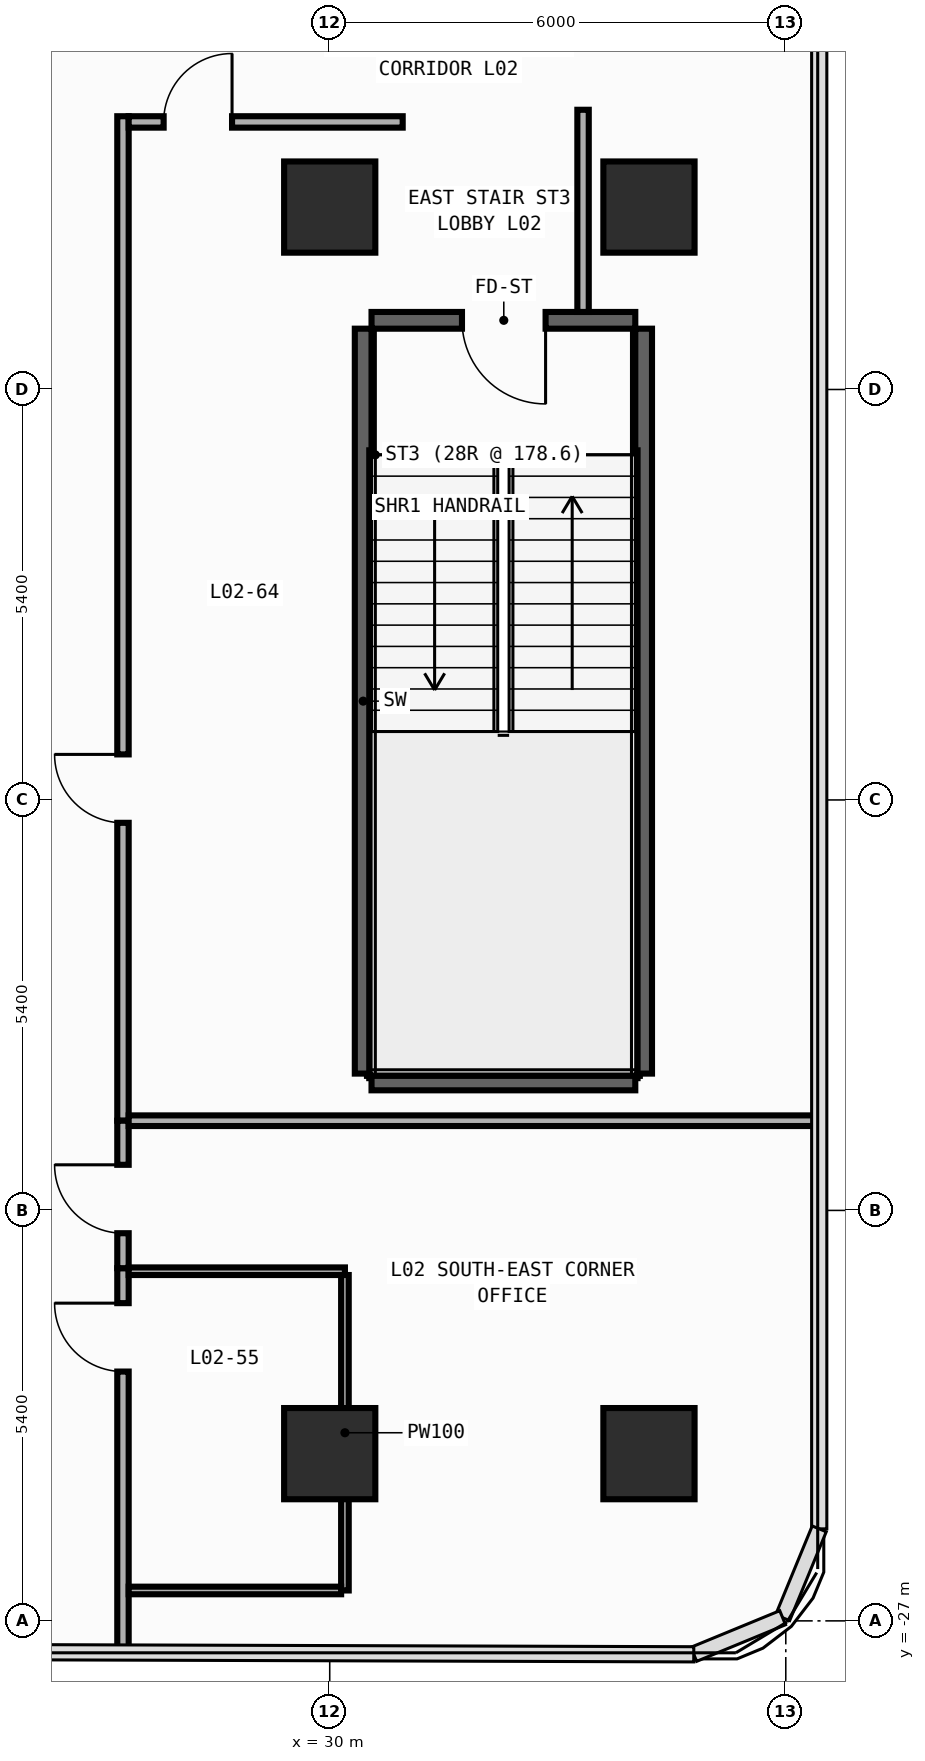
"""IFC4 building model, lengths in metres.
Left out: names, types, materials, properties, quantities, classifications, styles, units other than length and angle.
Written with IfcOpenShell. Run it as: python <this file> out.ifc"""

import sys

from ifc_helpers import new_model, si_unit, direction, frame, frame_2d, origin, origin_2d, place, context, subcontext, project, spatial, rectangle, extrude, element, fill, save


model = new_model("IFC4")
c1 = context("Model", 3, precision=1e-05, world=origin(), true_north=direction((0.0, 1.0)))
c2 = subcontext(c1, "Body", "Model", "MODEL_VIEW")
j1 = project(units=[si_unit("LENGTHUNIT", "METRE"), si_unit("PLANEANGLEUNIT", "RADIAN")], contexts=[c1])
p1 = place(None, origin())
s1 = spatial("IfcSite", under=j1, at=p1, CompositionType="ELEMENT")
p2 = place(p1, origin())
s2 = spatial("IfcBuilding", under=s1, at=p2, CompositionType="ELEMENT")
p3 = place(p2, frame((0.0, 0.0, 6.0)))
s3 = spatial("IfcBuildingStorey", under=s2, at=p3, CompositionType="ELEMENT", Elevation=6.0)
p4 = place(p3, frame((34.02, -9.89, 0.0), z_axis=(0.0, 0.0, 1.0), x_axis=(-1.0, 0.0, 0.0)))
e1 = element("IfcWall", 1, at=p4, inside=s3, PredefinedType="SHEAR", context=c2, shape_type="SweptSolid", body=[
    extrude(rectangle(XDim=3.47, YDim=0.22, at=frame_2d((1.735, 0.0))), origin(), (0.0, 0.0, 1.0), 4.7),
])
p5 = place(p4, frame((1.18, 0.0, 0.0)))
e2 = element("IfcOpeningElement", 2, at=p5, cuts=e1, PredefinedType="OPENING", context=c2, shape_type="SweptSolid", body=[
    extrude(rectangle(XDim=1.1, YDim=2.2, at=frame_2d((0.55, 1.1))), frame((0.0, 0.12, 0.0), z_axis=(0.0, -1.0, 0.0), x_axis=(1.0, 0.0, 0.0)), (0.0, 0.0, 1.0), 0.24),
])
p6 = place(p3, frame((30.55, -19.91, 0.0), z_axis=(0.0, 0.0, 1.0), x_axis=(1.0, 0.0, 0.0)))
e3 = element("IfcWall", 3, at=p6, inside=s3, PredefinedType="SHEAR", context=c2, shape_type="SweptSolid", body=[
    extrude(rectangle(XDim=3.47, YDim=0.22, at=frame_2d((1.735, 0.0))), origin(), (0.0, 0.0, 1.0), 4.7),
])
for number, where, z_axis, x_axis in (
    (4, (30.44, -19.8, 0.0), (0.0, 0.0, 1.0), (0.0, 1.0, 0.0)),
    (5, (34.13, -19.8, 0.0), (0.0, 0.0, 1.0), (0.0, 1.0, 0.0)),
):
    element("IfcWall", number, at=place(p3, frame(where, z_axis=z_axis, x_axis=x_axis)), inside=s3, PredefinedType="SHEAR", context=c2, shape_type="SweptSolid", body=[
        extrude(rectangle(XDim=9.8, YDim=0.22, at=frame_2d((4.9, 0.0))), origin(), (0.0, 0.0, 1.0), 4.7),
    ])
for number, where, z_axis, x_axis in (
    (6, (30.0, -24.8, 0.0), (0.0, 0.0, 1.0), (1.0, 0.0, 0.0)),
    (7, (30.0, -8.4, 0.0), (0.0, 0.0, 1.0), (1.0, 0.0, 0.0)),
    (8, (34.2, -24.8, 0.0), (0.0, 0.0, 1.0), (1.0, 0.0, 0.0)),
    (9, (34.2, -8.4, 0.0), (0.0, 0.0, 1.0), (1.0, 0.0, 0.0)),
):
    element("IfcColumn", number, at=place(p3, frame(where, z_axis=z_axis, x_axis=x_axis)), inside=s3, PredefinedType="COLUMN", context=c2, shape_type="SweptSolid", body=[
        extrude(rectangle(XDim=1.2, YDim=1.2, at=origin_2d()), origin(), (0.0, 0.0, 1.0), 5.0),
    ])
p7 = place(p3, frame((27.28, -27.421, 0.0), z_axis=(0.0, 0.0, 1.0), x_axis=(0.0, 1.0, 0.0)))
e10 = element("IfcWall", 10, at=p7, inside=s3, PredefinedType="PARTITIONING", context=c2, shape_type="SweptSolid", body=[
    extrude(rectangle(XDim=5.061, YDim=0.15, at=frame_2d((2.531, 0.0))), origin(), (0.0, 0.0, 1.0), 4.7),
])
p8 = place(p7, frame((3.701, 0.0, 0.0)))
e11 = element("IfcOpeningElement", 11, at=p8, cuts=e10, PredefinedType="OPENING", context=c2, shape_type="SweptSolid", body=[
    extrude(rectangle(XDim=0.9, YDim=2.15, at=frame_2d((0.45, 1.075))), frame((0.0, 0.085, 0.0), z_axis=(0.0, -1.0, 0.0), x_axis=(1.0, 0.0, 0.0)), (0.0, 0.0, 1.0), 0.17),
])
p9 = place(p3, frame((27.28, -20.42, 0.0), z_axis=(0.0, 0.0, 1.0), x_axis=(0.0, 1.0, 0.0)))
e12 = element("IfcWall", 12, at=p9, inside=s3, PredefinedType="PARTITIONING", context=c2, shape_type="SweptSolid", body=[
    extrude(rectangle(XDim=13.215, YDim=0.15, at=frame_2d((6.607, 0.0))), origin(), (0.0, 0.0, 1.0), 4.7),
])
p10 = place(p9, frame((3.919, 0.0, 0.0)))
e13 = element("IfcOpeningElement", 13, at=p10, cuts=e12, PredefinedType="OPENING", context=c2, shape_type="SweptSolid", body=[
    extrude(rectangle(XDim=0.9, YDim=2.15, at=frame_2d((0.45, 1.075))), frame((0.0, 0.085, 0.0), z_axis=(0.0, -1.0, 0.0), x_axis=(1.0, 0.0, 0.0)), (0.0, 0.0, 1.0), 0.17),
])
p11 = place(p3, frame((27.28, -22.36, 0.0), z_axis=(0.0, 0.0, 1.0), x_axis=(0.0, 1.0, 0.0)))
e14 = element("IfcWall", 14, at=p11, inside=s3, PredefinedType="PARTITIONING", context=c2, shape_type="SweptSolid", body=[
    extrude(rectangle(XDim=1.94, YDim=0.15, at=frame_2d((0.97, 0.0))), origin(), (0.0, 0.0, 1.0), 4.7),
])
p12 = place(p11, frame((0.46, 0.0, 0.0)))
e15 = element("IfcOpeningElement", 15, at=p12, cuts=e14, PredefinedType="OPENING", context=c2, shape_type="SweptSolid", body=[
    extrude(rectangle(XDim=0.9, YDim=2.15, at=frame_2d((0.45, 1.075))), frame((0.0, 0.085, 0.0), z_axis=(0.0, -1.0, 0.0), x_axis=(1.0, 0.0, 0.0)), (0.0, 0.0, 1.0), 0.17),
])
p13 = place(p3, frame((27.355, -7.28, 0.0), z_axis=(0.0, 0.0, 1.0), x_axis=(1.0, 0.0, 0.0)))
e16 = element("IfcWall", 16, at=p13, inside=s3, PredefinedType="PARTITIONING", context=c2, shape_type="SweptSolid", body=[
    extrude(rectangle(XDim=3.605, YDim=0.15, at=frame_2d((1.802, 0.0))), origin(), (0.0, 0.0, 1.0), 4.7),
])
p14 = place(p13, frame((0.46, 0.0, 0.0)))
e17 = element("IfcOpeningElement", 17, at=p14, cuts=e16, PredefinedType="OPENING", context=c2, shape_type="SweptSolid", body=[
    extrude(rectangle(XDim=0.9, YDim=2.15, at=frame_2d((0.45, 1.075))), frame((0.0, 0.085, 0.0), z_axis=(0.0, -1.0, 0.0), x_axis=(1.0, 0.0, 0.0)), (0.0, 0.0, 1.0), 0.17),
])
p15 = place(p3, frame((33.333, -9.78, 0.0), z_axis=(0.0, 0.0, 1.0), x_axis=(0.0, 1.0, 0.0)))
e18 = element("IfcWall", 18, at=p15, inside=s3, PredefinedType="PARTITIONING", context=c2, shape_type="SweptSolid", body=[
    extrude(rectangle(XDim=2.66, YDim=0.15, at=frame_2d((1.33, 0.0))), origin(), (0.0, 0.0, 1.0), 4.7),
])
p16 = place(p3, frame((27.355, -20.42, 0.0), z_axis=(0.0, 0.0, 1.0), x_axis=(1.0, 0.0, 0.0)))
e19 = element("IfcWall", 19, at=p16, inside=s3, PredefinedType="PARTITIONING", context=c2, shape_type="SweptSolid", body=[
    extrude(rectangle(XDim=9.09, YDim=0.14, at=frame_2d((4.545, 0.0))), origin(), (0.0, 0.0, 1.0), 4.7),
])
p17 = place(p3, frame((27.355, -22.4, 0.0), z_axis=(0.0, 0.0, 1.0), x_axis=(1.0, 0.0, 0.0)))
e20 = element("IfcWall", 20, at=p17, inside=s3, PredefinedType="PARTITIONING", context=c2, shape_type="SweptSolid", body=[
    extrude(rectangle(XDim=2.845, YDim=0.1, at=frame_2d((1.422, 0.0))), origin(), (0.0, 0.0, 1.0), 4.7),
])
p18 = place(p3, frame((30.2, -22.45, 0.0), z_axis=(0.0, 0.0, 1.0), x_axis=(0.0, -1.0, 0.0)))
e21 = element("IfcWall", 21, at=p18, inside=s3, PredefinedType="PARTITIONING", context=c2, shape_type="SweptSolid", body=[
    extrude(rectangle(XDim=4.15, YDim=0.1, at=frame_2d((2.075, 0.0))), origin(), (0.0, 0.0, 1.0), 4.7),
])
p19 = place(p3, frame((30.15, -26.6, 0.0), z_axis=(0.0, 0.0, 1.0), x_axis=(-1.0, 0.0, 0.0)))
e22 = element("IfcWall", 22, at=p19, inside=s3, PredefinedType="PARTITIONING", context=c2, shape_type="SweptSolid", body=[
    extrude(rectangle(XDim=2.795, YDim=0.1, at=frame_2d((1.397, 0.0))), origin(), (0.0, 0.0, 1.0), 4.7),
])
p20 = place(p5, origin())
e23 = element("IfcDoor", 23, at=p20, inside=s3, OperationType="SINGLE_SWING_LEFT", PredefinedType="DOOR", context=c2, shape_type="SweptSolid", body=[
    extrude(rectangle(XDim=1.1, YDim=2.2, at=frame_2d((0.55, 1.1))), frame((0.0, 0.025, 0.0), z_axis=(0.0, -1.0, 0.0), x_axis=(1.0, 0.0, 0.0)), (0.0, 0.0, 1.0), 0.05),
])
fill(e2, e23)
p21 = place(p8, origin())
e24 = element("IfcDoor", 24, at=p21, inside=s3, OperationType="SINGLE_SWING_RIGHT", PredefinedType="DOOR", context=c2, shape_type="SweptSolid", body=[
    extrude(rectangle(XDim=0.9, YDim=2.15, at=frame_2d((0.45, 1.075))), frame((0.0, 0.025, 0.0), z_axis=(0.0, -1.0, 0.0), x_axis=(1.0, 0.0, 0.0)), (0.0, 0.0, 1.0), 0.05),
])
fill(e11, e24)
p22 = place(p10, origin())
e25 = element("IfcDoor", 25, at=p22, inside=s3, OperationType="SINGLE_SWING_RIGHT", PredefinedType="DOOR", context=c2, shape_type="SweptSolid", body=[
    extrude(rectangle(XDim=0.9, YDim=2.15, at=frame_2d((0.45, 1.075))), frame((0.0, 0.025, 0.0), z_axis=(0.0, -1.0, 0.0), x_axis=(1.0, 0.0, 0.0)), (0.0, 0.0, 1.0), 0.05),
])
fill(e13, e25)
p23 = place(p12, origin())
e26 = element("IfcDoor", 26, at=p23, inside=s3, OperationType="SINGLE_SWING_RIGHT", PredefinedType="DOOR", context=c2, shape_type="SweptSolid", body=[
    extrude(rectangle(XDim=0.9, YDim=2.15, at=frame_2d((0.45, 1.075))), frame((0.0, 0.025, 0.0), z_axis=(0.0, -1.0, 0.0), x_axis=(1.0, 0.0, 0.0)), (0.0, 0.0, 1.0), 0.05),
])
fill(e15, e26)
p24 = place(p14, origin())
e27 = element("IfcDoor", 27, at=p24, inside=s3, OperationType="SINGLE_SWING_RIGHT", PredefinedType="DOOR", context=c2, shape_type="SweptSolid", body=[
    extrude(rectangle(XDim=0.9, YDim=2.15, at=frame_2d((0.45, 1.075))), frame((0.0, 0.025, 0.0), z_axis=(0.0, -1.0, 0.0), x_axis=(1.0, 0.0, 0.0)), (0.0, 0.0, 1.0), 0.05),
])
fill(e17, e27)
save(model, sys.argv[1])
